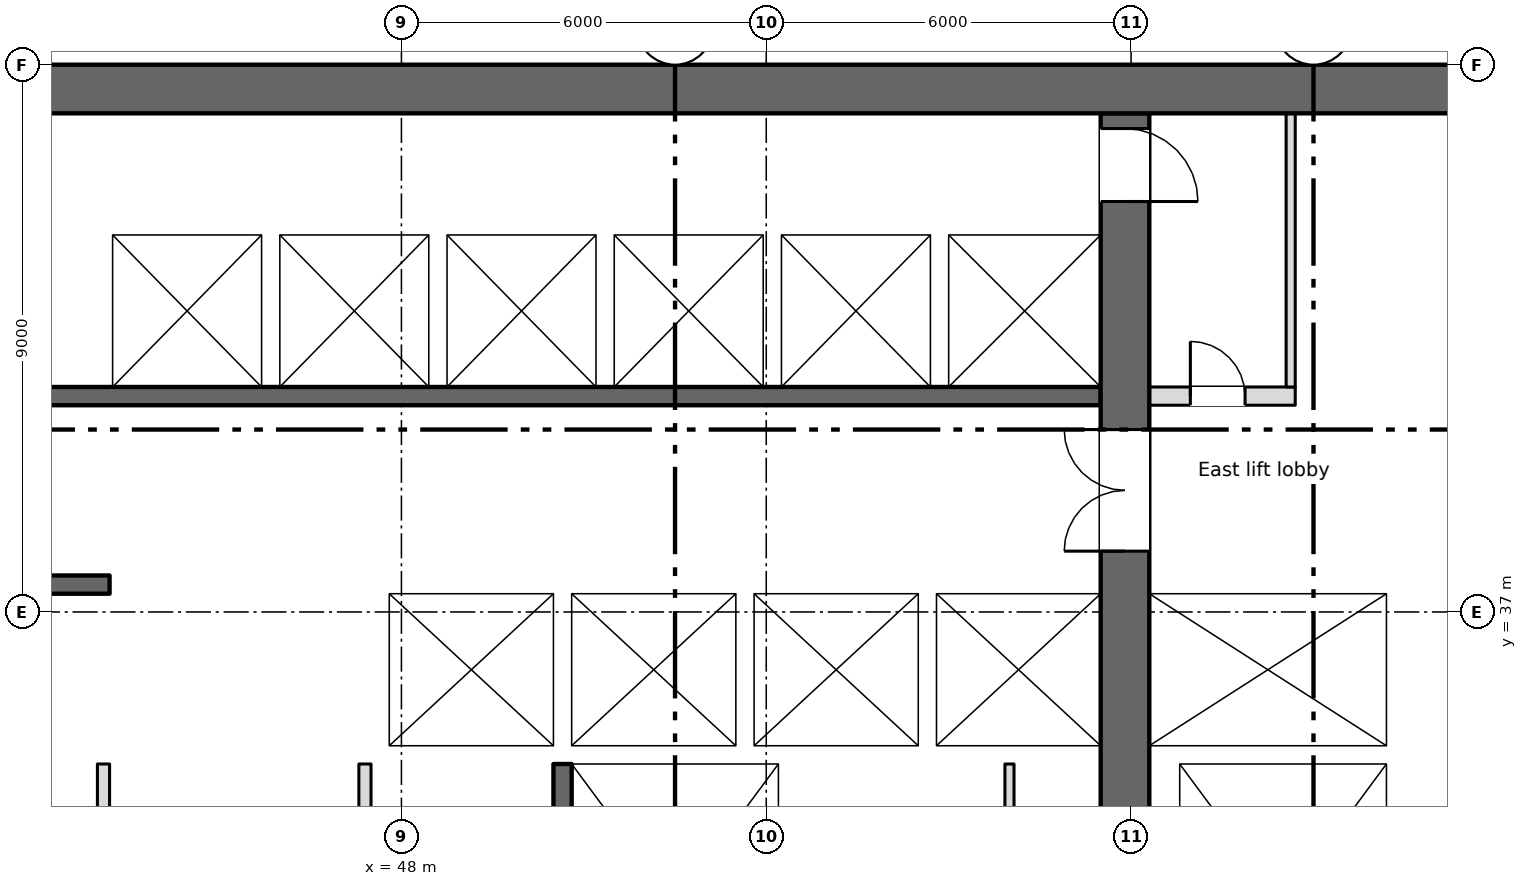
"""IFC4 building model, lengths in metres.
Left out: names, types, materials, properties, quantities, classifications, styles, units other than length and angle.
Written with IfcOpenShell. Run it as: python <this file> out.ifc"""

import sys

from ifc_helpers import new_model, si_unit, direction, frame, frame_2d, origin, place, context, subcontext, project, spatial, rectangle, extrude, element, fill, save


model = new_model("IFC4")
c1 = context("Model", 3, precision=1e-05, world=origin(), true_north=direction((0.0, 1.0)))
c2 = subcontext(c1, "Body", "Model", "MODEL_VIEW")
j1 = project(units=[si_unit("LENGTHUNIT", "METRE"), si_unit("PLANEANGLEUNIT", "RADIAN")], contexts=[c1])
p1 = place(None, origin())
s1 = spatial("IfcSite", under=j1, at=p1, CompositionType="ELEMENT")
p2 = place(p1, origin())
s2 = spatial("IfcBuilding", under=s1, at=p2, CompositionType="ELEMENT")
p3 = place(p2, frame((0.0, 0.0, 121.25)))
s3 = spatial("IfcBuildingStorey", under=s2, at=p3, CompositionType="ELEMENT", Elevation=121.25)
p4 = place(p3, frame((5.55, 45.6, 0.0), z_axis=(0.0, 0.0, 1.0), x_axis=(1.0, 0.0, 0.0)))
e1 = element("IfcWall", 1, at=p4, inside=s3, PredefinedType="SHEAR", context=c2, shape_type="SweptSolid", body=[
    extrude(rectangle(XDim=60.9, YDim=0.8, at=frame_2d((30.45, 0.0))), origin(), (0.0, 0.0, 1.0), 3.35),
])
p5 = place(p4, frame((7.2, 0.0, 0.6)))
e2 = element("IfcOpeningElement", 2, at=p5, cuts=e1, PredefinedType="OPENING", context=c2, shape_type="SweptSolid", body=[
    extrude(rectangle(XDim=0.6, YDim=2.4, at=frame_2d((0.3, 1.2))), frame((0.0, 0.41, 0.0), z_axis=(0.0, -1.0, 0.0), x_axis=(1.0, 0.0, 0.0)), (0.0, 0.0, 1.0), 0.82),
])
p6 = place(p3, frame((64.35, 34.8, 0.0), z_axis=(0.0, 0.0, 1.0), x_axis=(0.0, 1.0, 0.0)))
e3 = element("IfcWall", 3, at=p6, inside=s3, PredefinedType="SHEAR", context=c2, shape_type="SweptSolid", body=[
    extrude(rectangle(XDim=10.4, YDim=0.3, at=frame_2d((5.2, 0.0))), origin(), (0.0, 0.0, 1.0), 3.35),
])
p7 = place(p3, frame((59.9, 28.4, 0.0), z_axis=(0.0, 0.0, 1.0), x_axis=(0.0, 1.0, 0.0)))
e4 = element("IfcWall", 4, at=p7, inside=s3, PredefinedType="SHEAR", context=c2, shape_type="SweptSolid", body=[
    extrude(rectangle(XDim=16.8, YDim=0.8, at=frame_2d((8.4, 0.0))), origin(), (0.0, 0.0, 1.0), 3.35),
])
p8 = place(p7, frame((9.6, 0.0, 0.0)))
e5 = element("IfcOpeningElement", 5, at=p8, cuts=e4, PredefinedType="OPENING", context=c2, shape_type="SweptSolid", body=[
    extrude(rectangle(XDim=2.0, YDim=2.1, at=frame_2d((1.0, 1.05))), frame((0.0, 0.41, 0.0), z_axis=(0.0, -1.0, 0.0), x_axis=(1.0, 0.0, 0.0)), (0.0, 0.0, 1.0), 0.82),
])
p9 = place(p7, frame((15.35, 0.0, 0.0)))
e6 = element("IfcOpeningElement", 6, at=p9, cuts=e4, PredefinedType="OPENING", context=c2, shape_type="SweptSolid", body=[
    extrude(rectangle(XDim=1.2, YDim=2.1, at=frame_2d((0.6, 1.05))), frame((0.0, 0.41, 0.0), z_axis=(0.0, -1.0, 0.0), x_axis=(1.0, 0.0, 0.0)), (0.0, 0.0, 1.0), 0.82),
])
p10 = place(p3, frame((50.65, 34.5, 0.0), z_axis=(0.0, 0.0, 1.0), x_axis=(0.0, -1.0, 0.0)))
e7 = element("IfcWall", 7, at=p10, inside=s3, PredefinedType="SHEAR", context=c2, shape_type="SweptSolid", body=[
    extrude(rectangle(XDim=6.1, YDim=0.3, at=frame_2d((3.05, 0.0))), origin(), (0.0, 0.0, 1.0), 3.35),
])
p11 = place(p10, frame((4.95, 0.0, 0.0)))
e8 = element("IfcOpeningElement", 8, at=p11, cuts=e7, PredefinedType="OPENING", context=c2, shape_type="SweptSolid", body=[
    extrude(rectangle(XDim=1.1, YDim=2.1, at=frame_2d((0.55, 1.05))), frame((0.0, 0.16, 0.0), z_axis=(0.0, -1.0, 0.0), x_axis=(1.0, 0.0, 0.0)), (0.0, 0.0, 1.0), 0.32),
])
p12 = place(p3, frame((54.35, 28.4, 0.0), z_axis=(0.0, 0.0, 1.0), x_axis=(0.0, 1.0, 0.0)))
e9 = element("IfcWall", 9, at=p12, inside=s3, PredefinedType="SHEAR", context=c2, shape_type="SweptSolid", body=[
    extrude(rectangle(XDim=6.1, YDim=0.3, at=frame_2d((3.05, 0.0))), origin(), (0.0, 0.0, 1.0), 3.35),
])
p13 = place(p3, frame((60.55, 28.4, 0.0), z_axis=(0.0, 0.0, 1.0), x_axis=(0.0, 1.0, 0.0)))
e10 = element("IfcWall", 10, at=p13, inside=s3, PredefinedType="SHEAR", context=c2, shape_type="SweptSolid", body=[
    extrude(rectangle(XDim=6.1, YDim=0.5, at=frame_2d((3.05, 0.0))), origin(), (0.0, 0.0, 1.0), 3.35),
])
p14 = place(p3, frame((64.35, 28.4, 0.0), z_axis=(0.0, 0.0, 1.0), x_axis=(0.0, 1.0, 0.0)))
e11 = element("IfcWall", 11, at=p14, inside=s3, PredefinedType="SHEAR", context=c2, shape_type="SweptSolid", body=[
    extrude(rectangle(XDim=6.1, YDim=0.3, at=frame_2d((3.05, 0.0))), origin(), (0.0, 0.0, 1.0), 3.35),
])
p15 = place(p3, frame((34.8, 34.65, 0.0), z_axis=(0.0, 0.0, 1.0), x_axis=(1.0, 0.0, 0.0)))
e12 = element("IfcWall", 12, at=p15, inside=s3, PredefinedType="SHEAR", context=c2, shape_type="SweptSolid", body=[
    extrude(rectangle(XDim=8.4, YDim=0.3, at=frame_2d((4.2, 0.0))), origin(), (0.0, 0.0, 1.0), 3.35),
])
p16 = place(p3, frame((47.3, 34.65, 0.0), z_axis=(0.0, 0.0, 1.0), x_axis=(1.0, 0.0, 0.0)))
e13 = element("IfcWall", 13, at=p16, inside=s3, PredefinedType="SHEAR", context=c2, shape_type="SweptSolid", body=[
    extrude(rectangle(XDim=12.2, YDim=0.3, at=frame_2d((6.1, 0.0))), origin(), (0.0, 0.0, 1.0), 3.35),
])
p17 = place(p16, frame((1.3, 0.0, 0.0)))
e14 = element("IfcOpeningElement", 14, at=p17, cuts=e13, PredefinedType="OPENING", context=c2, shape_type="SweptSolid", body=[
    extrude(rectangle(XDim=1.1, YDim=2.1, at=frame_2d((0.55, 1.05))), frame((0.0, 0.16, 0.0), z_axis=(0.0, -1.0, 0.0), x_axis=(1.0, 0.0, 0.0)), (0.0, 0.0, 1.0), 0.32),
])
p18 = place(p3, frame((60.3, 34.65, 0.0), z_axis=(0.0, 0.0, 1.0), x_axis=(1.0, 0.0, 0.0)))
e15 = element("IfcWall", 15, at=p18, inside=s3, PredefinedType="SHEAR", context=c2, shape_type="SweptSolid", body=[
    extrude(rectangle(XDim=4.2, YDim=0.3, at=frame_2d((2.1, 0.0))), origin(), (0.0, 0.0, 1.0), 3.35),
])
p19 = place(p3, frame((43.2, 37.45, 0.0), z_axis=(0.0, 0.0, 1.0), x_axis=(-1.0, 0.0, 0.0)))
e16 = element("IfcWall", 16, at=p19, inside=s3, PredefinedType="SHEAR", context=c2, shape_type="SweptSolid", body=[
    extrude(rectangle(XDim=8.4, YDim=0.3, at=frame_2d((4.2, 0.0))), origin(), (0.0, 0.0, 1.0), 3.35),
])
p20 = place(p19, frame((3.75, 0.0, 0.0)))
e17 = element("IfcOpeningElement", 17, at=p20, cuts=e16, PredefinedType="OPENING", context=c2, shape_type="SweptSolid", body=[
    extrude(rectangle(XDim=0.9, YDim=2.1, at=frame_2d((0.45, 1.05))), frame((0.0, 0.16, 0.0), z_axis=(0.0, -1.0, 0.0), x_axis=(1.0, 0.0, 0.0)), (0.0, 0.0, 1.0), 0.32),
])
p21 = place(p3, frame((47.3, 37.45, 0.0), z_axis=(0.0, 0.0, 1.0), x_axis=(1.0, 0.0, 0.0)))
e18 = element("IfcWall", 18, at=p21, inside=s3, PredefinedType="SHEAR", context=c2, shape_type="SweptSolid", body=[
    extrude(rectangle(XDim=12.2, YDim=0.3, at=frame_2d((6.1, 0.0))), origin(), (0.0, 0.0, 1.0), 3.35),
])
p22 = place(p21, frame((4.3, 0.0, 0.0)))
e19 = element("IfcOpeningElement", 19, at=p22, cuts=e18, PredefinedType="OPENING", context=c2, shape_type="SweptSolid", body=[
    extrude(rectangle(XDim=1.1, YDim=2.1, at=frame_2d((0.55, 1.05))), frame((0.0, 0.16, 0.0), z_axis=(0.0, -1.0, 0.0), x_axis=(1.0, 0.0, 0.0)), (0.0, 0.0, 1.0), 0.32),
])
p23 = place(p21, frame((7.3, 0.0, 0.0)))
e20 = element("IfcOpeningElement", 20, at=p23, cuts=e18, PredefinedType="OPENING", context=c2, shape_type="SweptSolid", body=[
    extrude(rectangle(XDim=1.1, YDim=2.1, at=frame_2d((0.55, 1.05))), frame((0.0, 0.16, 0.0), z_axis=(0.0, -1.0, 0.0), x_axis=(1.0, 0.0, 0.0)), (0.0, 0.0, 1.0), 0.32),
])
p24 = place(p21, frame((10.3, 0.0, 0.0)))
e21 = element("IfcOpeningElement", 21, at=p24, cuts=e18, PredefinedType="OPENING", context=c2, shape_type="SweptSolid", body=[
    extrude(rectangle(XDim=1.1, YDim=2.1, at=frame_2d((0.55, 1.05))), frame((0.0, 0.16, 0.0), z_axis=(0.0, -1.0, 0.0), x_axis=(1.0, 0.0, 0.0)), (0.0, 0.0, 1.0), 0.32),
])
p25 = place(p3, frame((60.3, 37.45, 0.0), z_axis=(0.0, 0.0, 1.0), x_axis=(1.0, 0.0, 0.0)))
e22 = element("IfcWall", 22, at=p25, inside=s3, PredefinedType="SHEAR", context=c2, shape_type="SweptSolid", body=[
    extrude(rectangle(XDim=3.9, YDim=0.3, at=frame_2d((1.95, 0.0))), origin(), (0.0, 0.0, 1.0), 3.35),
])
p26 = place(p25, frame((1.4, 0.0, 0.0)))
e23 = element("IfcOpeningElement", 23, at=p26, cuts=e22, PredefinedType="OPENING", context=c2, shape_type="SweptSolid", body=[
    extrude(rectangle(XDim=1.1, YDim=2.1, at=frame_2d((0.55, 1.05))), frame((0.0, 0.16, 0.0), z_axis=(0.0, -1.0, 0.0), x_axis=(1.0, 0.0, 0.0)), (0.0, 0.0, 1.0), 0.32),
])
p27 = place(p3, frame((43.05, 34.8, 0.0), z_axis=(0.0, 0.0, 1.0), x_axis=(0.0, 1.0, 0.0)))
e24 = element("IfcWall", 24, at=p27, inside=s3, PredefinedType="SHEAR", context=c2, shape_type="SweptSolid", body=[
    extrude(rectangle(XDim=2.5, YDim=0.3, at=frame_2d((1.25, 0.0))), origin(), (0.0, 0.0, 1.0), 3.35),
])
p28 = place(p3, frame((47.55, 34.8, 0.0), z_axis=(0.0, 0.0, 1.0), x_axis=(0.0, 1.0, 0.0)))
e25 = element("IfcWall", 25, at=p28, inside=s3, PredefinedType="SHEAR", context=c2, shape_type="SweptSolid", body=[
    extrude(rectangle(XDim=2.5, YDim=0.5, at=frame_2d((1.25, 0.0))), origin(), (0.0, 0.0, 1.0), 3.35),
])
p29 = place(p3, frame((50.65, 34.8, 0.0), z_axis=(0.0, 0.0, 1.0), x_axis=(0.0, 1.0, 0.0)))
e26 = element("IfcWall", 26, at=p29, inside=s3, PredefinedType="SHEAR", context=c2, shape_type="SweptSolid", body=[
    extrude(rectangle(XDim=2.5, YDim=0.3, at=frame_2d((1.25, 0.0))), origin(), (0.0, 0.0, 1.0), 3.35),
])
p30 = place(p3, frame((18.5, 40.55, 0.0), z_axis=(0.0, 0.0, 1.0), x_axis=(1.0, 0.0, 0.0)))
e27 = element("IfcWall", 27, at=p30, inside=s3, PredefinedType="SHEAR", context=c2, shape_type="SweptSolid", body=[
    extrude(rectangle(XDim=41.0, YDim=0.3, at=frame_2d((20.5, 0.0))), origin(), (0.0, 0.0, 1.0), 3.35),
])
p31 = place(p30, frame((18.65, 0.0, 0.0)))
e28 = element("IfcOpeningElement", 28, at=p31, cuts=e27, PredefinedType="OPENING", context=c2, shape_type="SweptSolid", body=[
    extrude(rectangle(XDim=0.9, YDim=2.1, at=frame_2d((0.45, 1.05))), frame((0.0, 0.16, 0.0), z_axis=(0.0, -1.0, 0.0), x_axis=(1.0, 0.0, 0.0)), (0.0, 0.0, 1.0), 0.32),
])
p32 = place(p30, frame((6.175, 0.0, 0.0)))
e29 = element("IfcOpeningElement", 29, at=p32, cuts=e27, PredefinedType="OPENING", context=c2, shape_type="SweptSolid", body=[
    extrude(rectangle(XDim=1.1, YDim=2.1, at=frame_2d((0.55, 1.05))), frame((0.0, 0.16, 0.0), z_axis=(0.0, -1.0, 0.0), x_axis=(1.0, 0.0, 0.0)), (0.0, 0.0, 1.0), 0.32),
])
p33 = place(p30, frame((8.925, 0.0, 0.0)))
e30 = element("IfcOpeningElement", 30, at=p33, cuts=e27, PredefinedType="OPENING", context=c2, shape_type="SweptSolid", body=[
    extrude(rectangle(XDim=1.1, YDim=2.1, at=frame_2d((0.55, 1.05))), frame((0.0, 0.16, 0.0), z_axis=(0.0, -1.0, 0.0), x_axis=(1.0, 0.0, 0.0)), (0.0, 0.0, 1.0), 0.32),
])
p34 = place(p30, frame((11.675, 0.0, 0.0)))
e31 = element("IfcOpeningElement", 31, at=p34, cuts=e27, PredefinedType="OPENING", context=c2, shape_type="SweptSolid", body=[
    extrude(rectangle(XDim=1.1, YDim=2.1, at=frame_2d((0.55, 1.05))), frame((0.0, 0.16, 0.0), z_axis=(0.0, -1.0, 0.0), x_axis=(1.0, 0.0, 0.0)), (0.0, 0.0, 1.0), 0.32),
])
p35 = place(p30, frame((30.925, 0.0, 0.0)))
e32 = element("IfcOpeningElement", 32, at=p35, cuts=e27, PredefinedType="OPENING", context=c2, shape_type="SweptSolid", body=[
    extrude(rectangle(XDim=1.1, YDim=2.1, at=frame_2d((0.55, 1.05))), frame((0.0, 0.16, 0.0), z_axis=(0.0, -1.0, 0.0), x_axis=(1.0, 0.0, 0.0)), (0.0, 0.0, 1.0), 0.32),
])
p36 = place(p30, frame((33.675, 0.0, 0.0)))
e33 = element("IfcOpeningElement", 33, at=p36, cuts=e27, PredefinedType="OPENING", context=c2, shape_type="SweptSolid", body=[
    extrude(rectangle(XDim=1.1, YDim=2.1, at=frame_2d((0.55, 1.05))), frame((0.0, 0.16, 0.0), z_axis=(0.0, -1.0, 0.0), x_axis=(1.0, 0.0, 0.0)), (0.0, 0.0, 1.0), 0.32),
])
p37 = place(p30, frame((36.375, 0.0, 0.0)))
e34 = element("IfcOpeningElement", 34, at=p37, cuts=e27, PredefinedType="OPENING", context=c2, shape_type="SweptSolid", body=[
    extrude(rectangle(XDim=1.2, YDim=2.1, at=frame_2d((0.6, 1.05))), frame((0.0, 0.16, 0.0), z_axis=(0.0, -1.0, 0.0), x_axis=(1.0, 0.0, 0.0)), (0.0, 0.0, 1.0), 0.32),
])
p38 = place(p30, frame((39.15, 0.0, 0.0)))
e35 = element("IfcOpeningElement", 35, at=p38, cuts=e27, PredefinedType="OPENING", context=c2, shape_type="SweptSolid", body=[
    extrude(rectangle(XDim=1.2, YDim=2.1, at=frame_2d((0.6, 1.05))), frame((0.0, 0.16, 0.0), z_axis=(0.0, -1.0, 0.0), x_axis=(1.0, 0.0, 0.0)), (0.0, 0.0, 1.0), 0.32),
])
p39 = place(p3, frame((18.5, 43.35, 0.0), z_axis=(0.0, 0.0, 1.0), x_axis=(1.0, 0.0, 0.0)))
e36 = element("IfcWall", 36, at=p39, inside=s3, PredefinedType="SHEAR", context=c2, shape_type="SweptSolid", body=[
    extrude(rectangle(XDim=41.0, YDim=0.3, at=frame_2d((20.5, 0.0))), origin(), (0.0, 0.0, 1.0), 3.35),
])
p40 = place(p3, frame((60.3, 40.55, 0.0), z_axis=(0.0, 0.0, 1.0), x_axis=(1.0, 0.0, 0.0)))
e37 = element("IfcWall", 37, at=p40, inside=s3, PredefinedType="PARTITIONING", context=c2, shape_type="SweptSolid", body=[
    extrude(rectangle(XDim=2.4, YDim=0.3, at=frame_2d((1.2, 0.0))), origin(), (0.0, 0.0, 1.0), 3.35),
])
p41 = place(p40, frame((0.675, 0.0, 0.0)))
e38 = element("IfcOpeningElement", 38, at=p41, cuts=e37, PredefinedType="OPENING", context=c2, shape_type="SweptSolid", body=[
    extrude(rectangle(XDim=0.9, YDim=2.1, at=frame_2d((0.45, 1.05))), frame((0.0, 0.16, 0.0), z_axis=(0.0, -1.0, 0.0), x_axis=(1.0, 0.0, 0.0)), (0.0, 0.0, 1.0), 0.32),
])
for number, where, z_axis, x_axis in (
    (39, (53.65, 34.8, 0.0), (0.0, 0.0, 1.0), (0.0, 1.0, 0.0)),
    (40, (56.65, 34.8, 0.0), (0.0, 0.0, 1.0), (0.0, 1.0, 0.0)),
    (41, (43.1, 40.7, 0.0), (0.0, 0.0, 1.0), (0.0, 1.0, 0.0)),
    (42, (45.85, 40.7, 0.0), (0.0, 0.0, 1.0), (0.0, 1.0, 0.0)),
    (43, (48.6, 40.7, 0.0), (0.0, 0.0, 1.0), (0.0, 1.0, 0.0)),
    (44, (51.35, 40.7, 0.0), (0.0, 0.0, 1.0), (0.0, 1.0, 0.0)),
    (45, (54.1, 40.7, 0.0), (0.0, 0.0, 1.0), (0.0, 1.0, 0.0)),
    (46, (56.85, 40.7, 0.0), (0.0, 0.0, 1.0), (0.0, 1.0, 0.0)),
):
    element("IfcWall", number, at=place(p3, frame(where, z_axis=z_axis, x_axis=x_axis)), inside=s3, PredefinedType="SHEAR", context=c2, shape_type="SweptSolid", body=[
        extrude(rectangle(XDim=2.5, YDim=0.3, at=frame_2d((1.25, 0.0))), origin(), (0.0, 0.0, 1.0), 3.35),
    ])
for number, where, z_axis, x_axis in (
    (47, (43.1, 28.4, 0.0), (0.0, 0.0, 1.0), (0.0, 1.0, 0.0)),
    (48, (47.4, 28.4, 0.0), (0.0, 0.0, 1.0), (0.0, 1.0, 0.0)),
):
    element("IfcWall", number, at=place(p3, frame(where, z_axis=z_axis, x_axis=x_axis)), inside=s3, PredefinedType="PARTITIONING", context=c2, shape_type="SweptSolid", body=[
        extrude(rectangle(XDim=6.1, YDim=0.2, at=frame_2d((3.05, 0.0))), origin(), (0.0, 0.0, 1.0), 3.35),
    ])
p42 = place(p3, frame((62.625, 40.7, 0.0), z_axis=(0.0, 0.0, 1.0), x_axis=(0.0, 1.0, 0.0)))
e49 = element("IfcWall", 49, at=p42, inside=s3, PredefinedType="PARTITIONING", context=c2, shape_type="SweptSolid", body=[
    extrude(rectangle(XDim=4.5, YDim=0.15, at=frame_2d((2.25, 0.0))), origin(), (0.0, 0.0, 1.0), 3.35),
])
p43 = place(p3, frame((58.0, 28.4, 0.0), z_axis=(0.0, 0.0, 1.0), x_axis=(0.0, 1.0, 0.0)))
e50 = element("IfcWall", 50, at=p43, inside=s3, PredefinedType="PARTITIONING", context=c2, shape_type="SweptSolid", body=[
    extrude(rectangle(XDim=6.1, YDim=0.15, at=frame_2d((3.05, 0.0))), origin(), (0.0, 0.0, 1.0), 3.35),
])
p44 = place(p41, origin())
e51 = element("IfcDoor", 51, at=p44, inside=s3, OperationType="SINGLE_SWING_LEFT", PredefinedType="DOOR", context=c2, shape_type="SweptSolid", body=[
    extrude(rectangle(XDim=0.9, YDim=2.1, at=frame_2d((0.45, 1.05))), frame((0.0, 0.025, 0.0), z_axis=(0.0, -1.0, 0.0), x_axis=(1.0, 0.0, 0.0)), (0.0, 0.0, 1.0), 0.05),
])
fill(e38, e51)
p45 = place(p22, origin())
e52 = element("IfcDoor", 52, at=p45, inside=s3, OperationType="SLIDING_TO_LEFT", PredefinedType="DOOR", context=c2, shape_type="SweptSolid", body=[
    extrude(rectangle(XDim=1.1, YDim=2.1, at=frame_2d((0.55, 1.05))), frame((0.0, 0.025, 0.0), z_axis=(0.0, -1.0, 0.0), x_axis=(1.0, 0.0, 0.0)), (0.0, 0.0, 1.0), 0.05),
])
fill(e19, e52)
p46 = place(p23, origin())
e53 = element("IfcDoor", 53, at=p46, inside=s3, OperationType="SLIDING_TO_LEFT", PredefinedType="DOOR", context=c2, shape_type="SweptSolid", body=[
    extrude(rectangle(XDim=1.1, YDim=2.1, at=frame_2d((0.55, 1.05))), frame((0.0, 0.025, 0.0), z_axis=(0.0, -1.0, 0.0), x_axis=(1.0, 0.0, 0.0)), (0.0, 0.0, 1.0), 0.05),
])
fill(e20, e53)
p47 = place(p24, origin())
e54 = element("IfcDoor", 54, at=p47, inside=s3, OperationType="SLIDING_TO_LEFT", PredefinedType="DOOR", context=c2, shape_type="SweptSolid", body=[
    extrude(rectangle(XDim=1.1, YDim=2.1, at=frame_2d((0.55, 1.05))), frame((0.0, 0.025, 0.0), z_axis=(0.0, -1.0, 0.0), x_axis=(1.0, 0.0, 0.0)), (0.0, 0.0, 1.0), 0.05),
])
fill(e21, e54)
p48 = place(p35, origin())
e55 = element("IfcDoor", 55, at=p48, inside=s3, OperationType="SLIDING_TO_LEFT", PredefinedType="DOOR", context=c2, shape_type="SweptSolid", body=[
    extrude(rectangle(XDim=1.1, YDim=2.1, at=frame_2d((0.55, 1.05))), frame((0.0, 0.025, 0.0), z_axis=(0.0, -1.0, 0.0), x_axis=(1.0, 0.0, 0.0)), (0.0, 0.0, 1.0), 0.05),
])
fill(e32, e55)
p49 = place(p36, origin())
e56 = element("IfcDoor", 56, at=p49, inside=s3, OperationType="SLIDING_TO_LEFT", PredefinedType="DOOR", context=c2, shape_type="SweptSolid", body=[
    extrude(rectangle(XDim=1.1, YDim=2.1, at=frame_2d((0.55, 1.05))), frame((0.0, 0.025, 0.0), z_axis=(0.0, -1.0, 0.0), x_axis=(1.0, 0.0, 0.0)), (0.0, 0.0, 1.0), 0.05),
])
fill(e33, e56)
p50 = place(p37, origin())
e57 = element("IfcDoor", 57, at=p50, inside=s3, OperationType="SLIDING_TO_LEFT", PredefinedType="DOOR", context=c2, shape_type="SweptSolid", body=[
    extrude(rectangle(XDim=1.2, YDim=2.1, at=frame_2d((0.6, 1.05))), frame((0.0, 0.025, 0.0), z_axis=(0.0, -1.0, 0.0), x_axis=(1.0, 0.0, 0.0)), (0.0, 0.0, 1.0), 0.05),
])
fill(e34, e57)
p51 = place(p38, origin())
e58 = element("IfcDoor", 58, at=p51, inside=s3, OperationType="SLIDING_TO_LEFT", PredefinedType="DOOR", context=c2, shape_type="SweptSolid", body=[
    extrude(rectangle(XDim=1.2, YDim=2.1, at=frame_2d((0.6, 1.05))), frame((0.0, 0.025, 0.0), z_axis=(0.0, -1.0, 0.0), x_axis=(1.0, 0.0, 0.0)), (0.0, 0.0, 1.0), 0.05),
])
fill(e35, e58)
p52 = place(p26, origin())
e59 = element("IfcDoor", 59, at=p52, inside=s3, OperationType="SLIDING_TO_LEFT", PredefinedType="DOOR", context=c2, shape_type="SweptSolid", body=[
    extrude(rectangle(XDim=1.1, YDim=2.1, at=frame_2d((0.55, 1.05))), frame((0.0, 0.025, 0.0), z_axis=(0.0, -1.0, 0.0), x_axis=(1.0, 0.0, 0.0)), (0.0, 0.0, 1.0), 0.05),
])
fill(e23, e59)
p53 = place(p17, origin())
e60 = element("IfcDoor", 60, at=p53, inside=s3, OperationType="SLIDING_TO_LEFT", PredefinedType="DOOR", context=c2, shape_type="SweptSolid", body=[
    extrude(rectangle(XDim=1.1, YDim=2.1, at=frame_2d((0.55, 1.05))), frame((0.0, 0.025, 0.0), z_axis=(0.0, -1.0, 0.0), x_axis=(1.0, 0.0, 0.0)), (0.0, 0.0, 1.0), 0.05),
])
fill(e14, e60)
p54 = place(p8, origin())
e61 = element("IfcDoor", 61, at=p54, inside=s3, OperationType="DOUBLE_DOOR_SINGLE_SWING", PredefinedType="DOOR", context=c2, shape_type="SweptSolid", body=[
    extrude(rectangle(XDim=2.0, YDim=2.1, at=frame_2d((1.0, 1.05))), frame((0.0, 0.025, 0.0), z_axis=(0.0, -1.0, 0.0), x_axis=(1.0, 0.0, 0.0)), (0.0, 0.0, 1.0), 0.05),
])
fill(e5, e61)
p55 = place(p9, origin())
e62 = element("IfcDoor", 62, at=p55, inside=s3, OperationType="SINGLE_SWING_LEFT", PredefinedType="DOOR", context=c2, shape_type="SweptSolid", body=[
    extrude(rectangle(XDim=1.2, YDim=2.1, at=frame_2d((0.6, 1.05))), frame((0.0, 0.025, 0.0), z_axis=(0.0, -1.0, 0.0), x_axis=(1.0, 0.0, 0.0)), (0.0, 0.0, 1.0), 0.05),
])
fill(e6, e62)
save(model, sys.argv[1])
